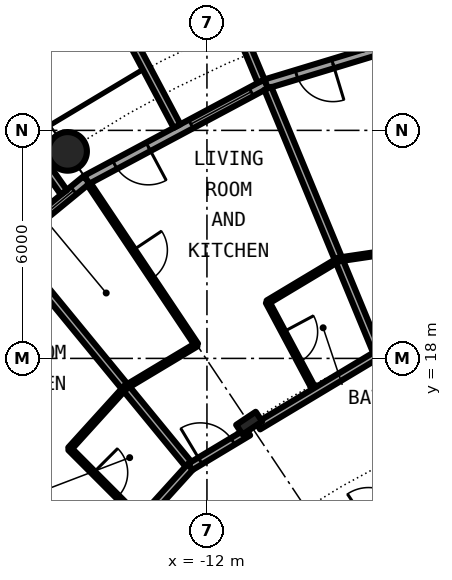
"""IFC4 building model, lengths in metres.
Left out: names, types, materials, properties, quantities, classifications, styles, units other than length and angle.
Written with IfcOpenShell. Run it as: python <this file> out.ifc"""

import sys

from ifc_helpers import new_model, si_unit, direction, frame, frame_2d, origin, origin_2d, place, context, subcontext, project, spatial, rectangle, hollow_circle, i_section, extrude, element, fill, save


model = new_model("IFC4")
c1 = context("Model", 3, precision=1e-05, world=origin(), true_north=direction((0.0, 1.0)))
c2 = subcontext(c1, "Body", "Model", "MODEL_VIEW")
j1 = project(units=[si_unit("LENGTHUNIT", "METRE"), si_unit("PLANEANGLEUNIT", "RADIAN")], contexts=[c1])
p1 = place(None, origin())
s1 = spatial("IfcSite", under=j1, at=p1, CompositionType="ELEMENT")
p2 = place(p1, origin())
s2 = spatial("IfcBuilding", under=s1, at=p2, CompositionType="ELEMENT")
p3 = place(p2, frame((0.0, 0.0, 28.9)))
s3 = spatial("IfcBuildingStorey", under=s2, at=p3, CompositionType="ELEMENT", Elevation=28.9)
p4 = place(p3, frame((-15.667, 23.448, 0.0), z_axis=(0.0, 0.0, 1.0), x_axis=(1.0, 0.0, 0.0)))
e1 = element("IfcColumn", 1, at=p4, inside=s3, PredefinedType="COLUMN", context=c2, shape_type="SweptSolid", body=[
    extrude(hollow_circle(Radius=0.508, WallThickness=0.05, at=origin_2d()), origin(), (0.0, 0.0, 1.0), 3.05),
])
p5 = place(p3, frame((-10.889, 16.297, 0.0), z_axis=(0.0, 0.0, 1.0), x_axis=(-0.55557023302, 0.831469612303, 0.0)))
e2 = element("IfcColumn", 2, at=p5, inside=s3, PredefinedType="COLUMN", context=c2, shape_type="SweptSolid", body=[
    extrude(i_section(OverallWidth=0.305, OverallDepth=0.62, WebThickness=0.021, FlangeThickness=0.04, FilletRadius=0.027, at=origin_2d()), origin(), (0.0, 0.0, 1.0), 3.05),
])
p6 = place(p3, frame((-5.326, 26.775, 0.0), z_axis=(0.0, 0.0, 1.0), x_axis=(-0.956965678721, -0.290201119486, 0.0)))
e3 = element("IfcWall", 3, at=p6, inside=s3, PredefinedType="SOLIDWALL", context=c2, shape_type="SweptSolid", body=[
    extrude(rectangle(XDim=5.351, YDim=0.25, at=frame_2d((2.676, 0.0))), origin(), (0.0, 0.0, 1.0), 2.7),
])
p7 = place(p6, frame((0.441, 0.0, 0.3)))
e4 = element("IfcOpeningElement", 4, at=p7, cuts=e3, PredefinedType="OPENING", context=c2, shape_type="SweptSolid", body=[
    extrude(rectangle(XDim=1.8, YDim=2.1, at=frame_2d((0.9, 1.05))), frame((0.0, 0.135, 0.0), z_axis=(0.0, -1.0, 0.0), x_axis=(1.0, 0.0, 0.0)), (0.0, 0.0, 1.0), 0.27),
])
p8 = place(p6, frame((3.51, 0.0, 0.0)))
e5 = element("IfcOpeningElement", 5, at=p8, cuts=e3, PredefinedType="OPENING", context=c2, shape_type="SweptSolid", body=[
    extrude(rectangle(XDim=1.0, YDim=2.2, at=frame_2d((0.5, 1.1))), frame((0.0, 0.135, 0.0), z_axis=(0.0, -1.0, 0.0), x_axis=(1.0, 0.0, 0.0)), (0.0, 0.0, 1.0), 0.27),
])
p9 = place(p3, frame((-10.447, 25.222, 0.0), z_axis=(0.0, 0.0, 1.0), x_axis=(-0.881915646801, -0.471407246368, 0.0)))
e6 = element("IfcWall", 6, at=p9, inside=s3, PredefinedType="SOLIDWALL", context=c2, shape_type="SweptSolid", body=[
    extrude(rectangle(XDim=5.352, YDim=0.25, at=frame_2d((2.676, 0.0))), origin(), (0.0, 0.0, 1.0), 2.7),
])
p10 = place(p9, frame((0.441, 0.0, 0.3)))
e7 = element("IfcOpeningElement", 7, at=p10, cuts=e6, PredefinedType="OPENING", context=c2, shape_type="SweptSolid", body=[
    extrude(rectangle(XDim=1.8, YDim=2.1, at=frame_2d((0.9, 1.05))), frame((0.0, 0.135, 0.0), z_axis=(0.0, -1.0, 0.0), x_axis=(1.0, 0.0, 0.0)), (0.0, 0.0, 1.0), 0.27),
])
p11 = place(p9, frame((3.51, 0.0, 0.0)))
e8 = element("IfcOpeningElement", 8, at=p11, cuts=e6, PredefinedType="OPENING", context=c2, shape_type="SweptSolid", body=[
    extrude(rectangle(XDim=1.0, YDim=2.2, at=frame_2d((0.5, 1.1))), frame((0.0, 0.135, 0.0), z_axis=(0.0, -1.0, 0.0), x_axis=(1.0, 0.0, 0.0)), (0.0, 0.0, 1.0), 0.27),
])
p12 = place(p3, frame((-10.575, 25.295, -0.03), z_axis=(0.0, 0.0, 1.0), x_axis=(-0.385697364644, 0.922625353492, 0.0)))
e9 = element("IfcWall", 9, at=p12, inside=s3, PredefinedType="SOLIDWALL", context=c2, shape_type="SweptSolid", body=[
    extrude(rectangle(XDim=2.883, YDim=0.2, at=frame_2d((1.442, 0.0))), origin(), (0.0, 0.0, 1.0), 2.73),
])
p13 = place(p3, frame((-12.787, 24.113, -0.03), z_axis=(0.0, 0.0, 1.0), x_axis=(-0.468365282436, 0.883534924159, 0.0)))
e10 = element("IfcWall", 10, at=p13, inside=s3, PredefinedType="SOLIDWALL", context=c2, shape_type="SweptSolid", body=[
    extrude(rectangle(XDim=3.006, YDim=0.2, at=frame_2d((1.503, 0.0))), origin(), (0.0, 0.0, 1.0), 2.73),
])
p14 = place(p3, frame((-15.167, 22.699, 0.0), z_axis=(0.0, 0.0, 1.0), x_axis=(-0.773019449054, -0.634382322723, 0.0)))
e11 = element("IfcWall", 11, at=p14, inside=s3, PredefinedType="SOLIDWALL", context=c2, shape_type="SweptSolid", body=[
    extrude(rectangle(XDim=5.352, YDim=0.25, at=frame_2d((2.676, 0.0))), origin(), (0.0, 0.0, 1.0), 2.7),
])
p15 = place(p14, frame((0.441, 0.0, 0.3)))
e12 = element("IfcOpeningElement", 12, at=p15, cuts=e11, PredefinedType="OPENING", context=c2, shape_type="SweptSolid", body=[
    extrude(rectangle(XDim=1.8, YDim=2.1, at=frame_2d((0.9, 1.05))), frame((0.0, 0.135, 0.0), z_axis=(0.0, -1.0, 0.0), x_axis=(1.0, 0.0, 0.0)), (0.0, 0.0, 1.0), 0.27),
])
p16 = place(p14, frame((3.51, 0.0, 0.0)))
e13 = element("IfcOpeningElement", 13, at=p16, cuts=e11, PredefinedType="OPENING", context=c2, shape_type="SweptSolid", body=[
    extrude(rectangle(XDim=1.0, YDim=2.2, at=frame_2d((0.5, 1.1))), frame((0.0, 0.135, 0.0), z_axis=(0.0, -1.0, 0.0), x_axis=(1.0, 0.0, 0.0)), (0.0, 0.0, 1.0), 0.27),
])
p17 = place(p3, frame((-15.765, 22.37, -0.03), z_axis=(0.0, 0.0, 1.0), x_axis=(-0.576274612209, 0.817256123454, 0.0)))
e14 = element("IfcWall", 14, at=p17, inside=s3, PredefinedType="SOLIDWALL", context=c2, shape_type="SweptSolid", body=[
    extrude(rectangle(XDim=2.933, YDim=0.2, at=frame_2d((1.466, 0.0))), origin(), (0.0, 0.0, 1.0), 2.73),
])
p18 = place(p3, frame((-17.24, 21.007, 0.0), z_axis=(0.0, 0.0, 1.0), x_axis=(0.634381303318, -0.773020285633, 0.0)))
e15 = element("IfcWall", 15, at=p18, inside=s3, PredefinedType="PARTITIONING", context=c2, shape_type="SweptSolid", body=[
    extrude(rectangle(XDim=7.576, YDim=0.2, at=frame_2d((3.788, 0.0))), origin(), (0.0, 0.0, 1.0), 2.7),
])
p19 = place(p3, frame((-15.612, 15.622, 0.0), z_axis=(0.0, 0.0, 1.0), x_axis=(0.706741540154, -0.707471833659, 0.0)))
e16 = element("IfcWall", 16, at=p19, inside=s3, PredefinedType="PARTITIONING", context=c2, shape_type="SweptSolid", body=[
    extrude(rectangle(XDim=2.674, YDim=0.1, at=frame_2d((1.337, 0.0))), origin(), (0.0, 0.0, 1.0), 2.7),
])
p20 = place(p19, frame((0.887, 0.0, 0.0)))
e17 = element("IfcOpeningElement", 17, at=p20, cuts=e16, PredefinedType="OPENING", context=c2, shape_type="SweptSolid", body=[
    extrude(rectangle(XDim=0.9, YDim=2.3, at=frame_2d((0.45, 1.15))), frame((0.0, 0.06, 0.0), z_axis=(0.0, -1.0, 0.0), x_axis=(1.0, 0.0, 0.0)), (0.0, 0.0, 1.0), 0.12),
])
p21 = place(p3, frame((-15.105, 22.59, 0.0), z_axis=(0.0, 0.0, 1.0), x_axis=(0.555939561221, -0.831222716406, 0.0)))
e18 = element("IfcWall", 18, at=p21, inside=s3, PredefinedType="PARTITIONING", context=c2, shape_type="SweptSolid", body=[
    extrude(rectangle(XDim=5.089, YDim=0.1, at=frame_2d((2.544, 0.0))), origin(), (0.0, 0.0, 1.0), 2.7),
])
p22 = place(p21, frame((2.094, 0.0, 0.0)))
e19 = element("IfcOpeningElement", 19, at=p22, cuts=e18, PredefinedType="OPENING", context=c2, shape_type="SweptSolid", body=[
    extrude(rectangle(XDim=0.9, YDim=2.3, at=frame_2d((0.45, 1.15))), frame((0.0, 0.06, 0.0), z_axis=(0.0, -1.0, 0.0), x_axis=(1.0, 0.0, 0.0)), (0.0, 0.0, 1.0), 0.12),
])
p23 = place(p3, frame((-10.405, 19.481, 0.0), z_axis=(0.0, 0.0, 1.0), x_axis=(0.471151994359, -0.882052038267, 0.0)))
e20 = element("IfcWall", 20, at=p23, inside=s3, PredefinedType="PARTITIONING", context=c2, shape_type="SweptSolid", body=[
    extrude(rectangle(XDim=2.674, YDim=0.1, at=frame_2d((1.337, 0.0))), origin(), (0.0, 0.0, 1.0), 2.7),
])
p24 = place(p23, frame((0.887, 0.0, 0.0)))
e21 = element("IfcOpeningElement", 21, at=p24, cuts=e20, PredefinedType="OPENING", context=c2, shape_type="SweptSolid", body=[
    extrude(rectangle(XDim=0.9, YDim=2.3, at=frame_2d((0.45, 1.15))), frame((0.0, 0.06, 0.0), z_axis=(0.0, -1.0, 0.0), x_axis=(1.0, 0.0, 0.0)), (0.0, 0.0, 1.0), 0.12),
])
p25 = place(p3, frame((-10.398, 25.106, 0.0), z_axis=(0.0, 0.0, 1.0), x_axis=(0.382490346157, -0.923959487801, 0.0)))
e22 = element("IfcWall", 22, at=p25, inside=s3, PredefinedType="PARTITIONING", context=c2, shape_type="SweptSolid", body=[
    extrude(rectangle(XDim=7.574, YDim=0.2, at=frame_2d((3.787, 0.0))), origin(), (0.0, 0.0, 1.0), 2.7),
])
p26 = place(p3, frame((-14.039, 9.396, 0.0), z_axis=(0.0, 0.0, 1.0), x_axis=(0.831348689697, 0.555751163866, 0.0)))
e23 = element("IfcWall", 23, at=p26, inside=s3, PredefinedType="PARTITIONING", context=c2, shape_type="SweptSolid", body=[
    extrude(rectangle(XDim=12.914, YDim=0.2, at=frame_2d((6.457, 0.0))), origin(), (0.0, 0.0, 1.0), 2.7),
])
p27 = place(p26, frame((7.568, 0.0, 0.0)))
e24 = element("IfcOpeningElement", 24, at=p27, cuts=e23, PredefinedType="OPENING", context=c2, shape_type="SweptSolid", body=[
    extrude(rectangle(XDim=1.0, YDim=2.3, at=frame_2d((0.5, 1.15))), frame((0.0, 0.11, 0.0), z_axis=(0.0, -1.0, 0.0), x_axis=(1.0, 0.0, 0.0)), (0.0, 0.0, 1.0), 0.22),
])
p28 = place(p3, frame((-16.193, 11.003, 0.0), z_axis=(0.0, 0.0, 1.0), x_axis=(0.671514934772, 0.740991020444, 0.0)))
e25 = element("IfcWall", 25, at=p28, inside=s3, PredefinedType="PARTITIONING", context=c2, shape_type="SweptSolid", body=[
    extrude(rectangle(XDim=5.598, YDim=0.2, at=frame_2d((2.799, 0.0))), origin(), (0.0, 0.0, 1.0), 2.38),
])
p29 = place(p28, frame((1.293, 0.0, 0.0)))
e26 = element("IfcOpeningElement", 26, at=p29, cuts=e25, PredefinedType="OPENING", context=c2, shape_type="SweptSolid", body=[
    extrude(rectangle(XDim=1.0, YDim=2.3, at=frame_2d((0.5, 1.15))), frame((0.0, 0.11, 0.0), z_axis=(0.0, -1.0, 0.0), x_axis=(1.0, 0.0, 0.0)), (0.0, 0.0, 1.0), 0.22),
])
p30 = place(p3, frame((-12.439, 15.146, 0.0), z_axis=(0.0, 0.0, 1.0), x_axis=(0.857323214505, 0.514778501757, 0.0)))
e27 = element("IfcWall", 27, at=p30, inside=s3, PredefinedType="PARTITIONING", context=c2, shape_type="SweptSolid", body=[
    extrude(rectangle(XDim=1.778, YDim=0.2, at=frame_2d((0.889, 0.0))), origin(), (0.0, 0.0, 1.0), 2.38),
])
p31 = place(p30, frame((0.307, 0.0, 0.0)))
e28 = element("IfcOpeningElement", 28, at=p31, cuts=e27, PredefinedType="OPENING", context=c2, shape_type="SweptSolid", body=[
    extrude(rectangle(XDim=1.0, YDim=2.3, at=frame_2d((0.5, 1.15))), frame((0.0, 0.11, 0.0), z_axis=(0.0, -1.0, 0.0), x_axis=(1.0, 0.0, 0.0)), (0.0, 0.0, 1.0), 0.22),
])
p32 = place(p3, frame((-10.653, 16.218, 0.0), z_axis=(0.0, 0.0, 1.0), x_axis=(0.857656999296, 0.514222200569, 0.0)))
e29 = element("IfcWall", 29, at=p32, inside=s3, PredefinedType="PARTITIONING", context=c2, shape_type="SweptSolid", body=[
    extrude(rectangle(XDim=3.675, YDim=0.2, at=frame_2d((1.838, 0.0))), origin(), (0.0, 0.0, 1.0), 2.38),
])
p33 = place(p3, frame((-8.534, 20.603, 0.0), z_axis=(0.0, 0.0, 1.0), x_axis=(0.989187732684, 0.14665479708, 0.0)))
e30 = element("IfcWall", 30, at=p33, inside=s3, PredefinedType="PARTITIONING", context=c2, shape_type="SweptSolid", body=[
    extrude(rectangle(XDim=2.167, YDim=0.1, at=frame_2d((1.084, 0.0))), origin(), (0.0, 0.0, 1.0), 2.7),
])
p34 = place(p3, frame((-15.613, 15.621, 0.0), z_axis=(0.0, 0.0, 1.0), x_axis=(0.67169789574, 0.740825172937, 0.0)))
e31 = element("IfcWall", 31, at=p34, inside=s3, PredefinedType="PARTITIONING", context=c2, shape_type="SweptSolid", body=[
    extrude(rectangle(XDim=2.183, YDim=0.1, at=frame_2d((1.091, 0.0))), origin(), (0.0, 0.0, 1.0), 2.7),
])
for number, where, z_axis, x_axis in (
    (32, (-14.147, 17.237, 0.0), (0.0, 0.0, 1.0), (0.858, 0.514, 0.0)),
    (33, (-10.405, 19.481, 0.0), (0.0, 0.0, 1.0), (0.858, 0.514, 0.0)),
):
    element("IfcWall", number, at=place(p3, frame(where, z_axis=z_axis, x_axis=x_axis)), inside=s3, PredefinedType="PARTITIONING", context=c2, shape_type="SweptSolid", body=[
        extrude(rectangle(XDim=2.182, YDim=0.1, at=frame_2d((1.091, 0.0))), origin(), (0.0, 0.0, 1.0), 2.7),
    ])
p35 = place(p8, origin())
e34 = element("IfcDoor", 34, at=p35, inside=s3, OperationType="SINGLE_SWING_LEFT", PredefinedType="DOOR", context=c2, shape_type="SweptSolid", body=[
    extrude(rectangle(XDim=1.0, YDim=2.2, at=frame_2d((0.5, 1.1))), frame((0.0, 0.025, 0.0), z_axis=(0.0, -1.0, 0.0), x_axis=(1.0, 0.0, 0.0)), (0.0, 0.0, 1.0), 0.05),
])
fill(e5, e34)
p36 = place(p10, origin())
e35 = element("IfcWindow", 35, at=p36, inside=s3, PartitioningType="SINGLE_PANEL", PredefinedType="WINDOW", context=c2, shape_type="SweptSolid", body=[
    extrude(rectangle(XDim=1.8, YDim=2.1, at=frame_2d((0.9, 1.05))), frame((0.0, 0.03, 0.0), z_axis=(0.0, -1.0, 0.0), x_axis=(1.0, 0.0, 0.0)), (0.0, 0.0, 1.0), 0.06),
])
fill(e7, e35)
p37 = place(p11, origin())
e36 = element("IfcDoor", 36, at=p37, inside=s3, OperationType="SINGLE_SWING_LEFT", PredefinedType="DOOR", context=c2, shape_type="SweptSolid", body=[
    extrude(rectangle(XDim=1.0, YDim=2.2, at=frame_2d((0.5, 1.1))), frame((0.0, 0.025, 0.0), z_axis=(0.0, -1.0, 0.0), x_axis=(1.0, 0.0, 0.0)), (0.0, 0.0, 1.0), 0.05),
])
fill(e8, e36)
p38 = place(p15, origin())
e37 = element("IfcWindow", 37, at=p38, inside=s3, PartitioningType="SINGLE_PANEL", PredefinedType="WINDOW", context=c2, shape_type="SweptSolid", body=[
    extrude(rectangle(XDim=1.8, YDim=2.1, at=frame_2d((0.9, 1.05))), frame((0.0, 0.03, 0.0), z_axis=(0.0, -1.0, 0.0), x_axis=(1.0, 0.0, 0.0)), (0.0, 0.0, 1.0), 0.06),
])
fill(e12, e37)
p39 = place(p31, origin())
e38 = element("IfcDoor", 38, at=p39, inside=s3, OperationType="SINGLE_SWING_LEFT", PredefinedType="DOOR", context=c2, shape_type="SweptSolid", body=[
    extrude(rectangle(XDim=1.0, YDim=2.3, at=frame_2d((0.5, 1.15))), frame((0.0, 0.025, 0.0), z_axis=(0.0, -1.0, 0.0), x_axis=(1.0, 0.0, 0.0)), (0.0, 0.0, 1.0), 0.05),
])
fill(e28, e38)
p40 = place(p24, origin())
e39 = element("IfcDoor", 39, at=p40, inside=s3, OperationType="SINGLE_SWING_LEFT", PredefinedType="DOOR", context=c2, shape_type="SweptSolid", body=[
    extrude(rectangle(XDim=0.9, YDim=2.3, at=frame_2d((0.45, 1.15))), frame((0.0, 0.025, 0.0), z_axis=(0.0, -1.0, 0.0), x_axis=(1.0, 0.0, 0.0)), (0.0, 0.0, 1.0), 0.05),
])
fill(e21, e39)
p41 = place(p22, origin())
e40 = element("IfcDoor", 40, at=p41, inside=s3, OperationType="SINGLE_SWING_RIGHT", PredefinedType="DOOR", context=c2, shape_type="SweptSolid", body=[
    extrude(rectangle(XDim=0.9, YDim=2.3, at=frame_2d((0.45, 1.15))), frame((0.0, 0.025, 0.0), z_axis=(0.0, -1.0, 0.0), x_axis=(1.0, 0.0, 0.0)), (0.0, 0.0, 1.0), 0.05),
])
fill(e19, e40)
p42 = place(p20, origin())
e41 = element("IfcDoor", 41, at=p42, inside=s3, OperationType="SINGLE_SWING_RIGHT", PredefinedType="DOOR", context=c2, shape_type="SweptSolid", body=[
    extrude(rectangle(XDim=0.9, YDim=2.3, at=frame_2d((0.45, 1.15))), frame((0.0, 0.025, 0.0), z_axis=(0.0, -1.0, 0.0), x_axis=(1.0, 0.0, 0.0)), (0.0, 0.0, 1.0), 0.05),
])
fill(e17, e41)
save(model, sys.argv[1])
